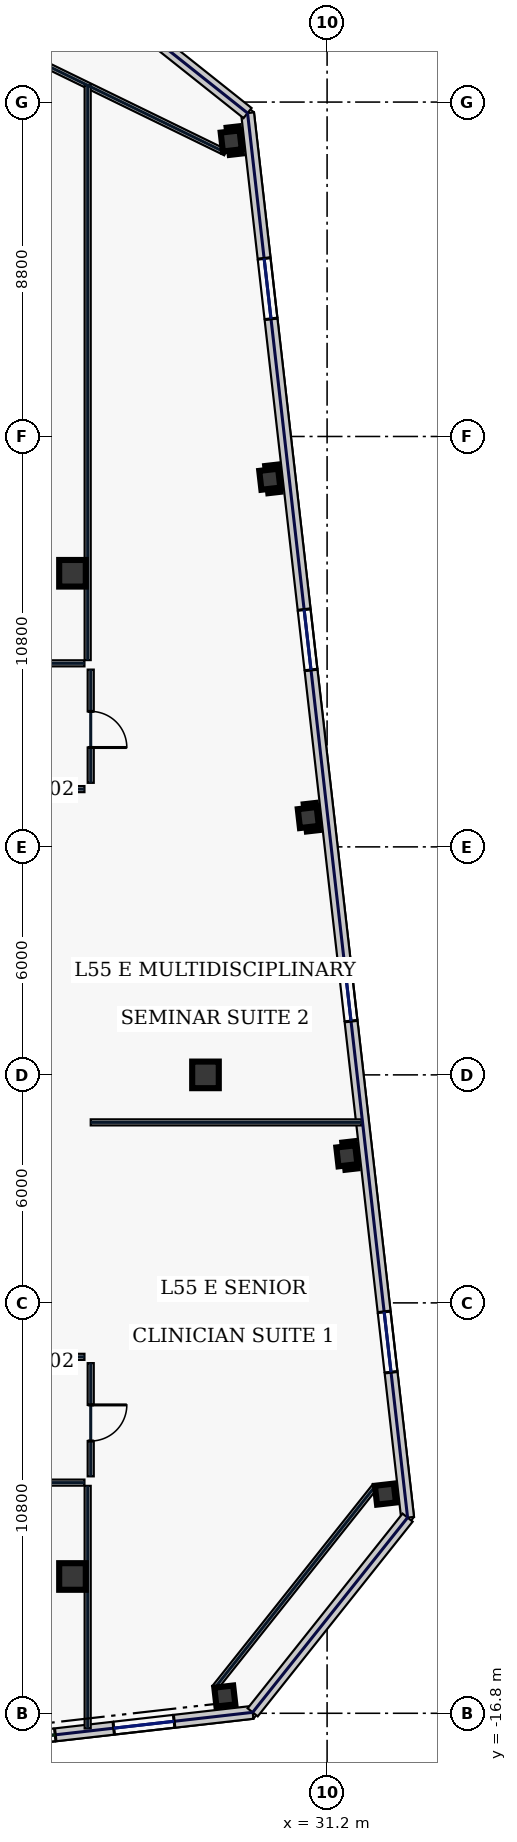
"""IFC4 building model, lengths in metres.
Left out: names, types, materials, properties, quantities, classifications, styles, units other than length and angle.
Written with IfcOpenShell. Run it as: python <this file> out.ifc"""

import sys

from ifc_helpers import new_model, si_unit, direction, frame, frame_2d, origin, origin_2d, place, context, subcontext, project, spatial, rectangle, hollow_rectangle, extrude, element, fill, save


model = new_model("IFC4")
c1 = context("Model", 3, precision=1e-05, world=origin(), true_north=direction((0.0, 1.0)))
c2 = subcontext(c1, "Body", "Model", "MODEL_VIEW")
j1 = project(units=[si_unit("LENGTHUNIT", "METRE"), si_unit("PLANEANGLEUNIT", "RADIAN")], contexts=[c1])
p1 = place(None, origin())
s1 = spatial("IfcSite", under=j1, at=p1, CompositionType="ELEMENT")
p2 = place(p1, origin())
s2 = spatial("IfcBuilding", under=s1, at=p2, CompositionType="ELEMENT")
p3 = place(p2, frame((0.0, 0.0, 238.2)))
s3 = spatial("IfcBuildingStorey", under=s2, at=p3, CompositionType="ELEMENT", Elevation=238.2)
for number, where, z_axis, x_axis in (
    (1, (24.5, -13.2, 0.0), (0.0, 0.0, 1.0), (1.0, 0.0, 0.0)),
    (2, (24.5, 13.2, 0.0), (0.0, 0.0, 1.0), (1.0, 0.0, 0.0)),
    (3, (28.0, 0.0, 0.0), (0.0, 0.0, 1.0), (1.0, 0.0, 0.0)),
):
    element("IfcColumn", number, at=place(p3, frame(where, z_axis=z_axis, x_axis=x_axis)), inside=s3, PredefinedType="COLUMN", context=c2, shape_type="SweptSolid", body=[
        extrude(hollow_rectangle(XDim=0.7, YDim=0.7, WallThickness=0.032, at=origin_2d()), origin(), (0.0, 0.0, 1.0), 4.54),
    ])
for number, where, z_axis, x_axis in (
    (4, (28.509, -16.345, 0.0), (0.0, 0.0, 1.0), (0.994, 0.113, 0.0)),
    (5, (32.734, -11.033, 0.0), (0.0, 0.0, 1.0), (0.994, 0.113, 0.0)),
    (6, (31.72, -2.131, 0.0), (0.0, 0.0, 1.0), (0.994, 0.113, 0.0)),
    (7, (30.706, 6.772, 0.0), (0.0, 0.0, 1.0), (0.994, 0.113, 0.0)),
    (8, (29.691, 15.674, 0.0), (0.0, 0.0, 1.0), (0.994, 0.113, 0.0)),
    (9, (28.677, 24.577, 0.0), (0.0, 0.0, 1.0), (0.994, 0.113, 0.0)),
):
    element("IfcColumn", number, at=place(p3, frame(where, z_axis=z_axis, x_axis=x_axis)), inside=s3, PredefinedType="COLUMN", context=c2, shape_type="SweptSolid", body=[
        extrude(hollow_rectangle(XDim=0.5, YDim=0.5, WallThickness=0.025, at=origin_2d()), origin(), (0.0, 0.0, 1.0), 4.54),
    ])
p4 = place(p3, frame((11.331, -18.816, 0.0), z_axis=(0.0, 0.0, 1.0), x_axis=(0.993571681878, 0.113204739165, 0.0)))
e10 = element("IfcWall", 10, at=p4, inside=s3, PredefinedType="STANDARD", context=c2, shape_type="SweptSolid", body=[
    extrude(rectangle(XDim=18.027, YDim=0.34, at=frame_2d((9.014, 0.0))), origin(), (0.0, 0.0, 1.0), 4.54),
])
p5 = place(p4, frame((3.8, 0.0, 0.9)))
e11 = element("IfcOpeningElement", 11, at=p5, cuts=e10, PredefinedType="OPENING", context=c2, shape_type="SweptSolid", body=[
    extrude(rectangle(XDim=0.85, YDim=1.85, at=frame_2d((0.425, 0.925))), frame((0.0, 0.18, 0.0), z_axis=(0.0, -1.0, 0.0), x_axis=(1.0, 0.0, 0.0)), (0.0, 0.0, 1.0), 0.36),
])
p6 = place(p4, frame((5.599, 0.0, 0.9)))
e12 = element("IfcOpeningElement", 12, at=p6, cuts=e10, PredefinedType="OPENING", context=c2, shape_type="SweptSolid", body=[
    extrude(rectangle(XDim=2.8, YDim=1.95, at=frame_2d((1.4, 0.975))), frame((0.0, 0.18, 0.0), z_axis=(0.0, -1.0, 0.0), x_axis=(1.0, 0.0, 0.0)), (0.0, 0.0, 1.0), 0.36),
])
p7 = place(p4, frame((9.999, 0.0, 0.9)))
e13 = element("IfcOpeningElement", 13, at=p7, cuts=e10, PredefinedType="OPENING", context=c2, shape_type="SweptSolid", body=[
    extrude(rectangle(XDim=2.8, YDim=1.95, at=frame_2d((1.4, 0.975))), frame((0.0, 0.18, 0.0), z_axis=(0.0, -1.0, 0.0), x_axis=(1.0, 0.0, 0.0)), (0.0, 0.0, 1.0), 0.36),
])
p8 = place(p4, frame((14.347, 0.0, 0.22)))
e14 = element("IfcOpeningElement", 14, at=p8, cuts=e10, PredefinedType="OPENING", context=c2, shape_type="SweptSolid", body=[
    extrude(rectangle(XDim=1.6, YDim=1.2, at=frame_2d((0.8, 0.6))), frame((0.0, 0.18, 0.0), z_axis=(0.0, -1.0, 0.0), x_axis=(1.0, 0.0, 0.0)), (0.0, 0.0, 1.0), 0.36),
])
p9 = place(p3, frame((33.318, -11.651, 0.0), z_axis=(0.0, 0.0, 1.0), x_axis=(-0.11320360501, 0.9935718111, 0.0)))
e15 = element("IfcWall", 15, at=p9, inside=s3, PredefinedType="STANDARD", context=c2, shape_type="SweptSolid", body=[
    extrude(rectangle(XDim=37.2, YDim=0.34, at=frame_2d((18.6, 0.0))), origin(), (0.0, 0.0, 1.0), 4.54),
])
p10 = place(p9, frame((3.85, 0.0, 0.58)))
e16 = element("IfcOpeningElement", 16, at=p10, cuts=e15, PredefinedType="OPENING", context=c2, shape_type="SweptSolid", body=[
    extrude(rectangle(XDim=1.6, YDim=2.3, at=frame_2d((0.8, 1.15))), frame((0.0, 0.18, 0.0), z_axis=(0.0, -1.0, 0.0), x_axis=(1.0, 0.0, 0.0)), (0.0, 0.0, 1.0), 0.36),
])
p11 = place(p9, frame((13.15, 0.0, 0.58)))
e17 = element("IfcOpeningElement", 17, at=p11, cuts=e15, PredefinedType="OPENING", context=c2, shape_type="SweptSolid", body=[
    extrude(rectangle(XDim=1.6, YDim=2.3, at=frame_2d((0.8, 1.15))), frame((0.0, 0.18, 0.0), z_axis=(0.0, -1.0, 0.0), x_axis=(1.0, 0.0, 0.0)), (0.0, 0.0, 1.0), 0.36),
])
p12 = place(p9, frame((22.45, 0.0, 0.58)))
e18 = element("IfcOpeningElement", 18, at=p12, cuts=e15, PredefinedType="OPENING", context=c2, shape_type="SweptSolid", body=[
    extrude(rectangle(XDim=1.6, YDim=2.3, at=frame_2d((0.8, 1.15))), frame((0.0, 0.18, 0.0), z_axis=(0.0, -1.0, 0.0), x_axis=(1.0, 0.0, 0.0)), (0.0, 0.0, 1.0), 0.36),
])
p13 = place(p9, frame((31.75, 0.0, 0.58)))
e19 = element("IfcOpeningElement", 19, at=p13, cuts=e15, PredefinedType="OPENING", context=c2, shape_type="SweptSolid", body=[
    extrude(rectangle(XDim=1.6, YDim=2.3, at=frame_2d((0.8, 1.15))), frame((0.0, 0.18, 0.0), z_axis=(0.0, -1.0, 0.0), x_axis=(1.0, 0.0, 0.0)), (0.0, 0.0, 1.0), 0.36),
])
for number, where, z_axis, x_axis in (
    (20, (29.242, -16.775, 0.0), (0.0, 0.0, 1.0), (0.623, 0.783, 0.0)),
    (21, (29.107, 25.31, 0.0), (0.0, 0.0, 1.0), (-0.783, 0.623, 0.0)),
):
    element("IfcWall", number, at=place(p3, frame(where, z_axis=z_axis, x_axis=x_axis)), inside=s3, PredefinedType="STANDARD", context=c2, shape_type="SweptSolid", body=[
        extrude(rectangle(XDim=6.548, YDim=0.34, at=frame_2d((3.274, 0.0))), origin(), (0.0, 0.0, 1.0), 4.54),
    ])
p14 = place(p3, frame((28.242, -16.134, 0.0), z_axis=(0.0, 0.0, 1.0), x_axis=(0.622521563328, 0.782602647064, 0.0)))
e22 = element("IfcWall", 22, at=p14, inside=s3, PredefinedType="PARTITIONING", context=c2, shape_type="SweptSolid", body=[
    extrude(rectangle(XDim=6.788, YDim=0.16, at=frame_2d((3.394, 0.0))), origin(), (0.0, 0.0, 1.0), 4.54),
])
p15 = place(p3, frame((28.528, 24.271, 0.0), z_axis=(0.0, 0.0, 1.0), x_axis=(-0.898820692789, 0.438316509173, 0.0)))
e23 = element("IfcWall", 23, at=p15, inside=s3, PredefinedType="PARTITIONING", context=c2, shape_type="SweptSolid", body=[
    extrude(rectangle(XDim=6.107, YDim=0.16, at=frame_2d((3.053, 0.0))), origin(), (0.0, 0.0, 1.0), 4.54),
])
p16 = place(p3, frame((-24.815, 10.83, 0.0), z_axis=(0.0, 0.0, 1.0), x_axis=(1.0, 0.0, 0.0)))
e24 = element("IfcWall", 24, at=p16, inside=s3, PredefinedType="PARTITIONING", context=c2, shape_type="SweptSolid", body=[
    extrude(rectangle(XDim=49.63, YDim=0.16, at=frame_2d((24.815, 0.0))), origin(), (0.0, 0.0, 1.0), 4.54),
])
p17 = place(p16, frame((2.044, 0.0, 0.0)))
e25 = element("IfcOpeningElement", 25, at=p17, cuts=e24, PredefinedType="OPENING", context=c2, shape_type="SweptSolid", body=[
    extrude(rectangle(XDim=0.95, YDim=2.2, at=frame_2d((0.475, 1.1))), frame((0.0, 0.09, 0.0), z_axis=(0.0, -1.0, 0.0), x_axis=(1.0, 0.0, 0.0)), (0.0, 0.0, 1.0), 0.18),
])
p18 = place(p16, frame((8.137, 0.0, 0.0)))
e26 = element("IfcOpeningElement", 26, at=p18, cuts=e24, PredefinedType="OPENING", context=c2, shape_type="SweptSolid", body=[
    extrude(rectangle(XDim=1.3, YDim=2.2, at=frame_2d((0.65, 1.1))), frame((0.0, 0.09, 0.0), z_axis=(0.0, -1.0, 0.0), x_axis=(1.0, 0.0, 0.0)), (0.0, 0.0, 1.0), 0.18),
])
p19 = place(p16, frame((16.137, 0.0, 0.0)))
e27 = element("IfcOpeningElement", 27, at=p19, cuts=e24, PredefinedType="OPENING", context=c2, shape_type="SweptSolid", body=[
    extrude(rectangle(XDim=0.95, YDim=2.2, at=frame_2d((0.475, 1.1))), frame((0.0, 0.09, 0.0), z_axis=(0.0, -1.0, 0.0), x_axis=(1.0, 0.0, 0.0)), (0.0, 0.0, 1.0), 0.18),
])
p20 = place(p16, frame((24.0, 0.0, 0.0)))
e28 = element("IfcOpeningElement", 28, at=p20, cuts=e24, PredefinedType="OPENING", context=c2, shape_type="SweptSolid", body=[
    extrude(rectangle(XDim=0.95, YDim=2.2, at=frame_2d((0.475, 1.1))), frame((0.0, 0.09, 0.0), z_axis=(0.0, -1.0, 0.0), x_axis=(1.0, 0.0, 0.0)), (0.0, 0.0, 1.0), 0.18),
])
p21 = place(p16, frame((31.9, 0.0, 0.0)))
e29 = element("IfcOpeningElement", 29, at=p21, cuts=e24, PredefinedType="OPENING", context=c2, shape_type="SweptSolid", body=[
    extrude(rectangle(XDim=1.05, YDim=2.2, at=frame_2d((0.525, 1.1))), frame((0.0, 0.09, 0.0), z_axis=(0.0, -1.0, 0.0), x_axis=(1.0, 0.0, 0.0)), (0.0, 0.0, 1.0), 0.18),
])
p22 = place(p16, frame((38.113, 0.0, 0.0)))
e30 = element("IfcOpeningElement", 30, at=p22, cuts=e24, PredefinedType="OPENING", context=c2, shape_type="SweptSolid", body=[
    extrude(rectangle(XDim=0.95, YDim=2.2, at=frame_2d((0.475, 1.1))), frame((0.0, 0.09, 0.0), z_axis=(0.0, -1.0, 0.0), x_axis=(1.0, 0.0, 0.0)), (0.0, 0.0, 1.0), 0.18),
])
p23 = place(p16, frame((42.637, 0.0, 0.0)))
e31 = element("IfcOpeningElement", 31, at=p23, cuts=e24, PredefinedType="OPENING", context=c2, shape_type="SweptSolid", body=[
    extrude(rectangle(XDim=0.95, YDim=2.2, at=frame_2d((0.475, 1.1))), frame((0.0, 0.09, 0.0), z_axis=(0.0, -1.0, 0.0), x_axis=(1.0, 0.0, 0.0)), (0.0, 0.0, 1.0), 0.18),
])
p24 = place(p16, frame((46.806, 0.0, 0.0)))
e32 = element("IfcOpeningElement", 32, at=p24, cuts=e24, PredefinedType="OPENING", context=c2, shape_type="SweptSolid", body=[
    extrude(rectangle(XDim=0.95, YDim=2.2, at=frame_2d((0.475, 1.1))), frame((0.0, 0.09, 0.0), z_axis=(0.0, -1.0, 0.0), x_axis=(1.0, 0.0, 0.0)), (0.0, 0.0, 1.0), 0.18),
])
p25 = place(p3, frame((24.98, 10.665, 0.0), z_axis=(0.0, 0.0, 1.0), x_axis=(0.0, -1.0, 0.0)))
e33 = element("IfcWall", 33, at=p25, inside=s3, PredefinedType="PARTITIONING", context=c2, shape_type="SweptSolid", body=[
    extrude(rectangle(XDim=2.98, YDim=0.16, at=frame_2d((1.49, 0.0))), origin(), (0.0, 0.0, 1.0), 4.54),
])
p26 = place(p25, frame((1.1, 0.0, 0.0)))
e34 = element("IfcOpeningElement", 34, at=p26, cuts=e33, PredefinedType="OPENING", context=c2, shape_type="SweptSolid", body=[
    extrude(rectangle(XDim=0.95, YDim=2.2, at=frame_2d((0.475, 1.1))), frame((0.0, 0.09, 0.0), z_axis=(0.0, -1.0, 0.0), x_axis=(1.0, 0.0, 0.0)), (0.0, 0.0, 1.0), 0.18),
])
for number, where, z_axis, x_axis in (
    (35, (24.815, 7.52, 0.0), (0.0, 0.0, 1.0), (-1.0, 0.0, 0.0)),
    (36, (10.715, -7.42, 0.0), (0.0, 0.0, 1.0), (1.0, 0.0, 0.0)),
):
    element("IfcWall", number, at=place(p3, frame(where, z_axis=z_axis, x_axis=x_axis)), inside=s3, PredefinedType="PARTITIONING", context=c2, shape_type="SweptSolid", body=[
        extrude(rectangle(XDim=14.1, YDim=0.16, at=frame_2d((7.05, 0.0))), origin(), (0.0, 0.0, 1.0), 4.54),
    ])
p27 = place(p3, frame((24.98, -7.585, 0.0), z_axis=(0.0, 0.0, 1.0), x_axis=(0.0, -1.0, 0.0)))
e37 = element("IfcWall", 37, at=p27, inside=s3, PredefinedType="PARTITIONING", context=c2, shape_type="SweptSolid", body=[
    extrude(rectangle(XDim=2.98, YDim=0.16, at=frame_2d((1.49, 0.0))), origin(), (0.0, 0.0, 1.0), 4.54),
])
p28 = place(p27, frame((1.1, 0.0, 0.0)))
e38 = element("IfcOpeningElement", 38, at=p28, cuts=e37, PredefinedType="OPENING", context=c2, shape_type="SweptSolid", body=[
    extrude(rectangle(XDim=0.95, YDim=2.2, at=frame_2d((0.475, 1.1))), frame((0.0, 0.09, 0.0), z_axis=(0.0, -1.0, 0.0), x_axis=(1.0, 0.0, 0.0)), (0.0, 0.0, 1.0), 0.18),
])
p29 = place(p3, frame((24.815, -10.73, 0.0), z_axis=(0.0, 0.0, 1.0), x_axis=(-1.0, 0.0, 0.0)))
e39 = element("IfcWall", 39, at=p29, inside=s3, PredefinedType="PARTITIONING", context=c2, shape_type="SweptSolid", body=[
    extrude(rectangle(XDim=49.63, YDim=0.16, at=frame_2d((24.815, 0.0))), origin(), (0.0, 0.0, 1.0), 4.54),
])
p30 = place(p29, frame((46.631, 0.0, 0.0)))
e40 = element("IfcOpeningElement", 40, at=p30, cuts=e39, PredefinedType="OPENING", context=c2, shape_type="SweptSolid", body=[
    extrude(rectangle(XDim=1.3, YDim=2.2, at=frame_2d((0.65, 1.1))), frame((0.0, 0.09, 0.0), z_axis=(0.0, -1.0, 0.0), x_axis=(1.0, 0.0, 0.0)), (0.0, 0.0, 1.0), 0.18),
])
p31 = place(p29, frame((38.325, 0.0, 0.0)))
e41 = element("IfcOpeningElement", 41, at=p31, cuts=e39, PredefinedType="OPENING", context=c2, shape_type="SweptSolid", body=[
    extrude(rectangle(XDim=1.3, YDim=2.2, at=frame_2d((0.65, 1.1))), frame((0.0, 0.09, 0.0), z_axis=(0.0, -1.0, 0.0), x_axis=(1.0, 0.0, 0.0)), (0.0, 0.0, 1.0), 0.18),
])
p32 = place(p29, frame((26.925, 0.0, 0.0)))
e42 = element("IfcOpeningElement", 42, at=p32, cuts=e39, PredefinedType="OPENING", context=c2, shape_type="SweptSolid", body=[
    extrude(rectangle(XDim=0.95, YDim=2.2, at=frame_2d((0.475, 1.1))), frame((0.0, 0.09, 0.0), z_axis=(0.0, -1.0, 0.0), x_axis=(1.0, 0.0, 0.0)), (0.0, 0.0, 1.0), 0.18),
])
p33 = place(p29, frame((16.375, 0.0, 0.0)))
e43 = element("IfcOpeningElement", 43, at=p33, cuts=e39, PredefinedType="OPENING", context=c2, shape_type="SweptSolid", body=[
    extrude(rectangle(XDim=1.15, YDim=2.2, at=frame_2d((0.575, 1.1))), frame((0.0, 0.09, 0.0), z_axis=(0.0, -1.0, 0.0), x_axis=(1.0, 0.0, 0.0)), (0.0, 0.0, 1.0), 0.18),
])
p34 = place(p29, frame((7.7, 0.0, 0.0)))
e44 = element("IfcOpeningElement", 44, at=p34, cuts=e39, PredefinedType="OPENING", context=c2, shape_type="SweptSolid", body=[
    extrude(rectangle(XDim=0.95, YDim=2.2, at=frame_2d((0.475, 1.1))), frame((0.0, 0.09, 0.0), z_axis=(0.0, -1.0, 0.0), x_axis=(1.0, 0.0, 0.0)), (0.0, 0.0, 1.0), 0.18),
])
p35 = place(p29, frame((1.869, 0.0, 0.0)))
e45 = element("IfcOpeningElement", 45, at=p35, cuts=e39, PredefinedType="OPENING", context=c2, shape_type="SweptSolid", body=[
    extrude(rectangle(XDim=1.3, YDim=2.2, at=frame_2d((0.65, 1.1))), frame((0.0, 0.09, 0.0), z_axis=(0.0, -1.0, 0.0), x_axis=(1.0, 0.0, 0.0)), (0.0, 0.0, 1.0), 0.18),
])
p36 = place(p3, frame((24.9, 10.915, 0.0), z_axis=(0.0, 0.0, 1.0), x_axis=(0.0, 1.0, 0.0)))
e46 = element("IfcWall", 46, at=p36, inside=s3, PredefinedType="PARTITIONING", context=c2, shape_type="SweptSolid", body=[
    extrude(rectangle(XDim=15.129, YDim=0.16, at=frame_2d((7.565, 0.0))), origin(), (0.0, 0.0, 1.0), 4.54),
])
p37 = place(p3, frame((24.9, -17.199, 0.0), z_axis=(0.0, 0.0, 1.0), x_axis=(0.0, 1.0, 0.0)))
e47 = element("IfcWall", 47, at=p37, inside=s3, PredefinedType="PARTITIONING", context=c2, shape_type="SweptSolid", body=[
    extrude(rectangle(XDim=6.385, YDim=0.16, at=frame_2d((3.192, 0.0))), origin(), (0.0, 0.0, 1.0), 4.54),
])
p38 = place(p3, frame((24.98, -1.25, 0.0), z_axis=(0.0, 0.0, 1.0), x_axis=(1.0, 0.0, 0.0)))
e48 = element("IfcWall", 48, at=p38, inside=s3, PredefinedType="PARTITIONING", context=c2, shape_type="SweptSolid", body=[
    extrude(rectangle(XDim=7.133, YDim=0.16, at=frame_2d((3.566, 0.0))), origin(), (0.0, 0.0, 1.0), 4.54),
])
p39 = place(p7, origin())
e49 = element("IfcWindow", 49, at=p39, inside=s3, PartitioningType="SINGLE_PANEL", PredefinedType="WINDOW", context=c2, shape_type="SweptSolid", body=[
    extrude(rectangle(XDim=2.8, YDim=1.95, at=frame_2d((1.4, 0.975))), frame((0.0, 0.03, 0.0), z_axis=(0.0, -1.0, 0.0), x_axis=(1.0, 0.0, 0.0)), (0.0, 0.0, 1.0), 0.06),
])
fill(e13, e49)
p40 = place(p8, origin())
e50 = element("IfcWindow", 50, at=p40, inside=s3, PartitioningType="SINGLE_PANEL", PredefinedType="WINDOW", context=c2, shape_type="SweptSolid", body=[
    extrude(rectangle(XDim=1.6, YDim=1.2, at=frame_2d((0.8, 0.6))), frame((0.0, 0.03, 0.0), z_axis=(0.0, -1.0, 0.0), x_axis=(1.0, 0.0, 0.0)), (0.0, 0.0, 1.0), 0.06),
])
fill(e14, e50)
p41 = place(p10, origin())
e51 = element("IfcWindow", 51, at=p41, inside=s3, PartitioningType="SINGLE_PANEL", PredefinedType="WINDOW", context=c2, shape_type="SweptSolid", body=[
    extrude(rectangle(XDim=1.6, YDim=2.3, at=frame_2d((0.8, 1.15))), frame((0.0, 0.03, 0.0), z_axis=(0.0, -1.0, 0.0), x_axis=(1.0, 0.0, 0.0)), (0.0, 0.0, 1.0), 0.06),
])
fill(e16, e51)
p42 = place(p11, origin())
e52 = element("IfcWindow", 52, at=p42, inside=s3, PartitioningType="SINGLE_PANEL", PredefinedType="WINDOW", context=c2, shape_type="SweptSolid", body=[
    extrude(rectangle(XDim=1.6, YDim=2.3, at=frame_2d((0.8, 1.15))), frame((0.0, 0.03, 0.0), z_axis=(0.0, -1.0, 0.0), x_axis=(1.0, 0.0, 0.0)), (0.0, 0.0, 1.0), 0.06),
])
fill(e17, e52)
p43 = place(p12, origin())
e53 = element("IfcWindow", 53, at=p43, inside=s3, PartitioningType="SINGLE_PANEL", PredefinedType="WINDOW", context=c2, shape_type="SweptSolid", body=[
    extrude(rectangle(XDim=1.6, YDim=2.3, at=frame_2d((0.8, 1.15))), frame((0.0, 0.03, 0.0), z_axis=(0.0, -1.0, 0.0), x_axis=(1.0, 0.0, 0.0)), (0.0, 0.0, 1.0), 0.06),
])
fill(e18, e53)
p44 = place(p13, origin())
e54 = element("IfcWindow", 54, at=p44, inside=s3, PartitioningType="SINGLE_PANEL", PredefinedType="WINDOW", context=c2, shape_type="SweptSolid", body=[
    extrude(rectangle(XDim=1.6, YDim=2.3, at=frame_2d((0.8, 1.15))), frame((0.0, 0.03, 0.0), z_axis=(0.0, -1.0, 0.0), x_axis=(1.0, 0.0, 0.0)), (0.0, 0.0, 1.0), 0.06),
])
fill(e19, e54)
p45 = place(p28, origin())
e55 = element("IfcDoor", 55, at=p45, inside=s3, OperationType="SINGLE_SWING_LEFT", PredefinedType="DOOR", context=c2, shape_type="SweptSolid", body=[
    extrude(rectangle(XDim=0.95, YDim=2.2, at=frame_2d((0.475, 1.1))), frame((0.0, 0.025, 0.0), z_axis=(0.0, -1.0, 0.0), x_axis=(1.0, 0.0, 0.0)), (0.0, 0.0, 1.0), 0.05),
])
fill(e38, e55)
p46 = place(p26, origin())
e56 = element("IfcDoor", 56, at=p46, inside=s3, OperationType="SINGLE_SWING_RIGHT", PredefinedType="DOOR", context=c2, shape_type="SweptSolid", body=[
    extrude(rectangle(XDim=0.95, YDim=2.2, at=frame_2d((0.475, 1.1))), frame((0.0, 0.025, 0.0), z_axis=(0.0, -1.0, 0.0), x_axis=(1.0, 0.0, 0.0)), (0.0, 0.0, 1.0), 0.05),
])
fill(e34, e56)
save(model, sys.argv[1])
